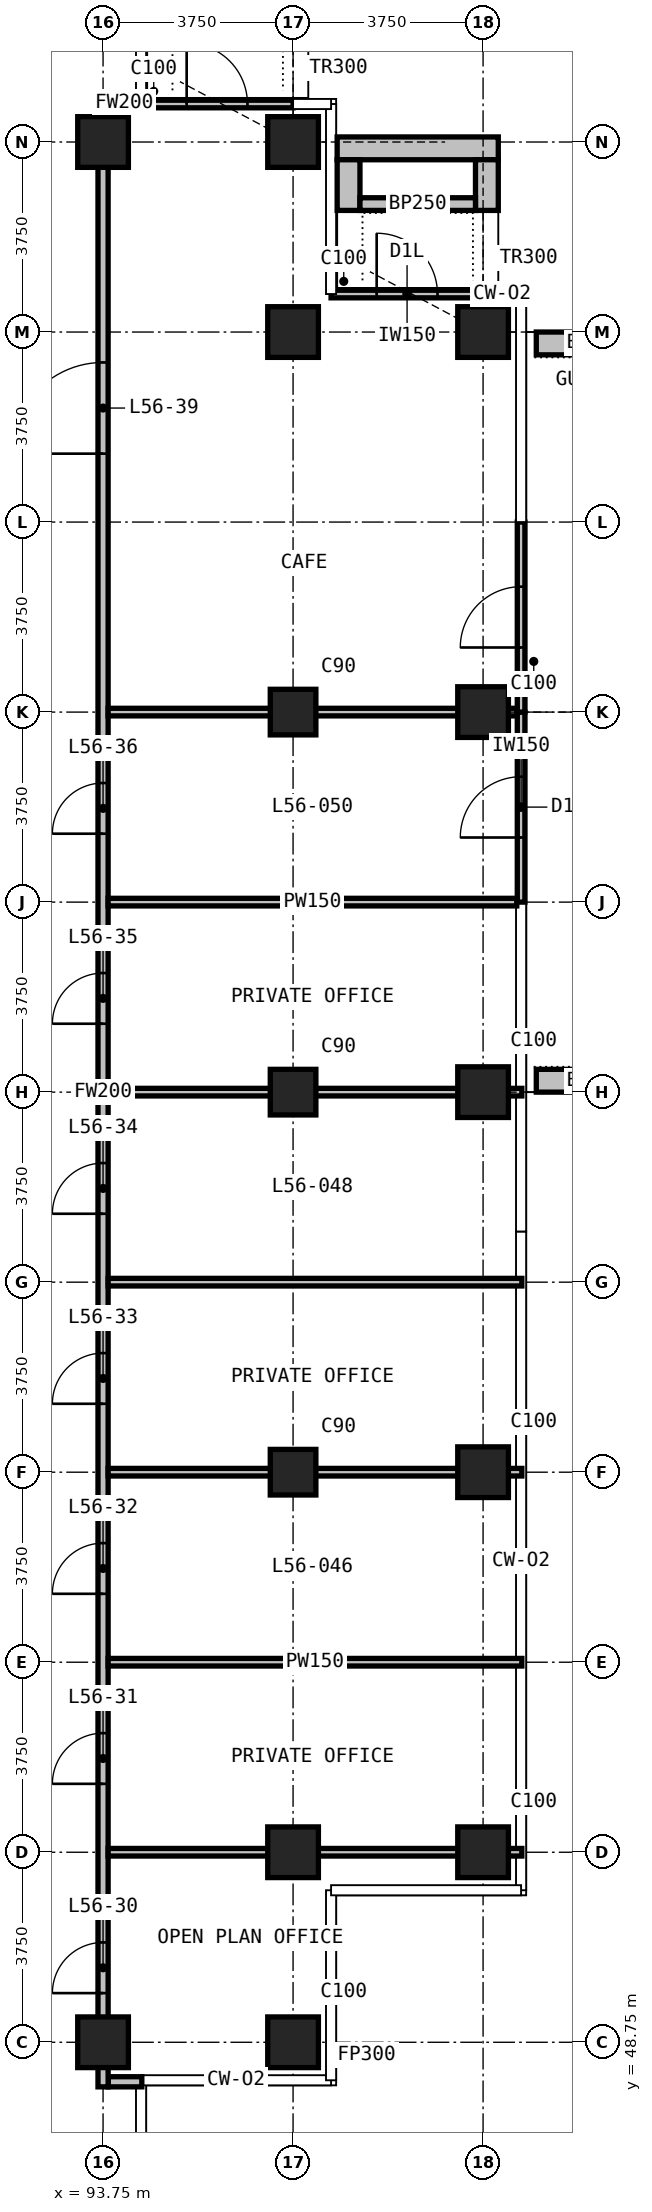
"""IFC4 building model, lengths in metres.
Left out: names, types, materials, properties, quantities, classifications, styles, units other than length and angle.
Written with IfcOpenShell. Run it as: python <this file> out.ifc"""

import sys

from ifc_helpers import new_model, si_unit, direction, frame, frame_2d, origin, origin_2d, place, context, subcontext, project, spatial, rectangle, extrude, element, fill, save


model = new_model("IFC4")
c1 = context("Model", 3, precision=1e-05, world=origin(), true_north=direction((0.0, 1.0)))
c2 = subcontext(c1, "Body", "Model", "MODEL_VIEW")
j1 = project(units=[si_unit("LENGTHUNIT", "METRE"), si_unit("PLANEANGLEUNIT", "RADIAN")], contexts=[c1])
p1 = place(None, origin())
s1 = spatial("IfcSite", under=j1, at=p1, CompositionType="ELEMENT")
p2 = place(p1, origin())
s2 = spatial("IfcBuilding", under=s1, at=p2, CompositionType="ELEMENT")
p3 = place(p2, frame((0.0, 0.0, 217.5)))
s3 = spatial("IfcBuildingStorey", under=s2, at=p3, CompositionType="ELEMENT", Elevation=217.5)
for number, where, z_axis, x_axis in (
    (1, (93.75, 48.75, 0.0), (0.0, 0.0, 1.0), (1.0, 0.0, 0.0)),
    (2, (93.75, 86.25, 0.0), (0.0, 0.0, 1.0), (1.0, 0.0, 0.0)),
    (3, (97.5, 48.75, 0.0), (0.0, 0.0, 1.0), (1.0, 0.0, 0.0)),
    (4, (97.5, 52.5, 0.0), (0.0, 0.0, 1.0), (1.0, 0.0, 0.0)),
):
    element("IfcColumn", number, at=place(p3, frame(where, z_axis=z_axis, x_axis=x_axis)), inside=s3, PredefinedType="COLUMN", context=c2, shape_type="SweptSolid", body=[
        extrude(rectangle(XDim=1.0, YDim=1.0, at=origin_2d()), origin(), (0.0, 0.0, 1.0), 3.6),
    ])
for number, where, z_axis, x_axis in (
    (5, (97.5, 60.0, 0.0), (0.0, 0.0, 1.0), (1.0, 0.0, 0.0)),
    (6, (97.5, 67.5, 0.0), (0.0, 0.0, 1.0), (1.0, 0.0, 0.0)),
    (7, (97.5, 75.0, 0.0), (0.0, 0.0, 1.0), (1.0, 0.0, 0.0)),
):
    element("IfcColumn", number, at=place(p3, frame(where, z_axis=z_axis, x_axis=x_axis)), inside=s3, PredefinedType="COLUMN", context=c2, shape_type="SweptSolid", body=[
        extrude(rectangle(XDim=0.9, YDim=0.9, at=origin_2d()), origin(), (0.0, 0.0, 1.0), 3.6),
    ])
for number, where, z_axis, x_axis in (
    (8, (97.5, 82.5, 0.0), (0.0, 0.0, 1.0), (1.0, 0.0, 0.0)),
    (9, (97.5, 86.25, 0.0), (0.0, 0.0, 1.0), (1.0, 0.0, 0.0)),
    (10, (101.25, 52.5, 0.0), (0.0, 0.0, 1.0), (1.0, 0.0, 0.0)),
    (11, (101.25, 60.0, 0.0), (0.0, 0.0, 1.0), (1.0, 0.0, 0.0)),
    (12, (101.25, 67.5, 0.0), (0.0, 0.0, 1.0), (1.0, 0.0, 0.0)),
    (13, (101.25, 75.0, 0.0), (0.0, 0.0, 1.0), (1.0, 0.0, 0.0)),
    (14, (101.25, 82.5, 0.0), (0.0, 0.0, 1.0), (1.0, 0.0, 0.0)),
):
    element("IfcColumn", number, at=place(p3, frame(where, z_axis=z_axis, x_axis=x_axis)), inside=s3, PredefinedType="COLUMN", context=c2, shape_type="SweptSolid", body=[
        extrude(rectangle(XDim=1.0, YDim=1.0, at=origin_2d()), origin(), (0.0, 0.0, 1.0), 3.6),
    ])
p4 = place(p3, frame((102.0, 71.25, 0.0), z_axis=(0.0, 0.0, 1.0), x_axis=(0.0, 1.0, 0.0)))
e15 = element("IfcWall", 15, at=p4, inside=s3, PredefinedType="SOLIDWALL", context=c2, shape_type="SweptSolid", body=[
    extrude(rectangle(XDim=3.75, YDim=0.15, at=frame_2d((1.875, 0.0))), origin(), (0.0, 0.0, 1.0), 3.3),
])
p5 = place(p4, frame((1.275, 0.0, 0.0)))
e16 = element("IfcOpeningElement", 16, at=p5, cuts=e15, PredefinedType="OPENING", context=c2, shape_type="SweptSolid", body=[
    extrude(rectangle(XDim=1.2, YDim=2.4, at=frame_2d((0.6, 1.2))), frame((0.0, 0.085, 0.0), z_axis=(0.0, -1.0, 0.0), x_axis=(1.0, 0.0, 0.0)), (0.0, 0.0, 1.0), 0.17),
])
p6 = place(p3, frame((102.0, 75.0, 0.0), z_axis=(0.0, 0.0, 1.0), x_axis=(0.0, 1.0, 0.0)))
e17 = element("IfcWall", 17, at=p6, inside=s3, PredefinedType="SOLIDWALL", context=c2, shape_type="SweptSolid", body=[
    extrude(rectangle(XDim=3.75, YDim=0.15, at=frame_2d((1.875, 0.0))), origin(), (0.0, 0.0, 1.0), 3.3),
])
p7 = place(p6, frame((1.275, 0.0, 0.0)))
e18 = element("IfcOpeningElement", 18, at=p7, cuts=e17, PredefinedType="OPENING", context=c2, shape_type="SweptSolid", body=[
    extrude(rectangle(XDim=1.2, YDim=2.4, at=frame_2d((0.6, 1.2))), frame((0.0, 0.085, 0.0), z_axis=(0.0, -1.0, 0.0), x_axis=(1.0, 0.0, 0.0)), (0.0, 0.0, 1.0), 0.17),
])
p8 = place(p3, frame((98.25, 83.25, 0.0), z_axis=(0.0, 0.0, 1.0), x_axis=(1.0, 0.0, 0.0)))
e19 = element("IfcWall", 19, at=p8, inside=s3, PredefinedType="SOLIDWALL", context=c2, shape_type="SweptSolid", body=[
    extrude(rectangle(XDim=3.0, YDim=0.15, at=frame_2d((1.5, 0.0))), origin(), (0.0, 0.0, 1.0), 3.3),
])
p9 = place(p8, frame((0.9, 0.0, 0.0)))
e20 = element("IfcOpeningElement", 20, at=p9, cuts=e19, PredefinedType="OPENING", context=c2, shape_type="SweptSolid", body=[
    extrude(rectangle(XDim=1.2, YDim=2.0, at=frame_2d((0.6, 1.0))), frame((0.0, 0.085, 0.0), z_axis=(0.0, -1.0, 0.0), x_axis=(1.0, 0.0, 0.0)), (0.0, 0.0, 1.0), 0.17),
])
p10 = place(p3, frame((94.5, 87.0, 0.0), z_axis=(0.0, 0.0, 1.0), x_axis=(1.0, 0.0, 0.0)))
e21 = element("IfcWall", 21, at=p10, inside=s3, PredefinedType="SOLIDWALL", context=c2, shape_type="SweptSolid", body=[
    extrude(rectangle(XDim=3.0, YDim=0.15, at=frame_2d((1.5, 0.0))), origin(), (0.0, 0.0, 1.0), 3.3),
])
p11 = place(p10, frame((0.9, 0.0, 0.0)))
e22 = element("IfcOpeningElement", 22, at=p11, cuts=e21, PredefinedType="OPENING", context=c2, shape_type="SweptSolid", body=[
    extrude(rectangle(XDim=1.2, YDim=2.0, at=frame_2d((0.6, 1.0))), frame((0.0, 0.085, 0.0), z_axis=(0.0, -1.0, 0.0), x_axis=(1.0, 0.0, 0.0)), (0.0, 0.0, 1.0), 0.17),
])
for number, where, z_axis, x_axis in (
    (23, (102.3, 67.725, 0.0), (0.0, 0.0, 1.0), (1.0, 0.0, 0.0)),
    (24, (102.3, 82.275, 0.0), (0.0, 0.0, 1.0), (1.0, 0.0, 0.0)),
):
    element("IfcWall", number, at=place(p3, frame(where, z_axis=z_axis, x_axis=x_axis)), inside=s3, PredefinedType="USERDEFINED", context=c2, shape_type="SweptSolid", body=[
        extrude(rectangle(XDim=2.35, YDim=0.45, at=frame_2d((1.175, 0.0))), origin(), (0.0, 0.0, 1.0), 1.1),
    ])
p12 = place(p3, frame((98.37, 86.125, 0.0), z_axis=(0.0, 0.0, 1.0), x_axis=(1.0, 0.0, 0.0)))
e25 = element("IfcWall", 25, at=p12, inside=s3, PredefinedType="USERDEFINED", context=c2, shape_type="SweptSolid", body=[
    extrude(rectangle(XDim=3.18, YDim=0.45, at=frame_2d((1.59, 0.0))), origin(), (0.0, 0.0, 1.0), 1.1),
])
for number, where, z_axis, x_axis in (
    (26, (98.595, 84.9, 0.0), (0.0, 0.0, 1.0), (0.0, 1.0, 0.0)),
    (27, (101.325, 84.9, 0.0), (0.0, 0.0, 1.0), (0.0, 1.0, 0.0)),
):
    element("IfcWall", number, at=place(p3, frame(where, z_axis=z_axis, x_axis=x_axis)), inside=s3, PredefinedType="USERDEFINED", context=c2, shape_type="SweptSolid", body=[
        extrude(rectangle(XDim=1.0, YDim=0.45, at=frame_2d((0.5, 0.0))), origin(), (0.0, 0.0, 1.0), 1.1),
    ])
p13 = place(p3, frame((98.82, 85.025, 0.0), z_axis=(0.0, 0.0, 1.0), x_axis=(1.0, 0.0, 0.0)))
e28 = element("IfcWall", 28, at=p13, inside=s3, PredefinedType="USERDEFINED", context=c2, shape_type="SweptSolid", body=[
    extrude(rectangle(XDim=2.28, YDim=0.25, at=frame_2d((1.14, 0.0))), origin(), (0.0, 0.0, 1.0), 1.0),
])
p14 = place(p3, frame((93.85, 47.97, 0.0), z_axis=(0.0, 0.0, 1.0), x_axis=(1.0, 0.0, 0.0)))
e29 = element("IfcWall", 29, at=p14, inside=s3, PredefinedType="PARTITIONING", context=c2, shape_type="SweptSolid", body=[
    extrude(rectangle(XDim=0.665, YDim=0.2, at=frame_2d((0.333, 0.0))), origin(), (0.0, 0.0, 1.0), 3.3),
])
p15 = place(p3, frame((93.85, 87.03, 0.0), z_axis=(0.0, 0.0, 1.0), x_axis=(1.0, 0.0, 0.0)))
e30 = element("IfcWall", 30, at=p15, inside=s3, PredefinedType="PARTITIONING", context=c2, shape_type="SweptSolid", body=[
    extrude(rectangle(XDim=0.64, YDim=0.2, at=frame_2d((0.32, 0.0))), origin(), (0.0, 0.0, 1.0), 3.3),
])
p16 = place(p3, frame((93.75, 47.87, 0.0), z_axis=(0.0, 0.0, 1.0), x_axis=(0.0, 1.0, 0.0)))
e31 = element("IfcWall", 31, at=p16, inside=s3, PredefinedType="PARTITIONING", context=c2, shape_type="SweptSolid", body=[
    extrude(rectangle(XDim=39.26, YDim=0.2, at=frame_2d((19.63, 0.0))), origin(), (0.0, 0.0, 1.0), 3.3),
])
p17 = place(p16, frame((1.85, 0.0, 0.0)))
e32 = element("IfcOpeningElement", 32, at=p17, cuts=e31, PredefinedType="OPENING", context=c2, shape_type="SweptSolid", body=[
    extrude(rectangle(XDim=1.0, YDim=2.2, at=frame_2d((0.5, 1.1))), frame((0.0, 0.11, 0.0), z_axis=(0.0, -1.0, 0.0), x_axis=(1.0, 0.0, 0.0)), (0.0, 0.0, 1.0), 0.22),
])
p18 = place(p16, frame((5.98, 0.0, 0.0)))
e33 = element("IfcOpeningElement", 33, at=p18, cuts=e31, PredefinedType="OPENING", context=c2, shape_type="SweptSolid", body=[
    extrude(rectangle(XDim=1.0, YDim=2.2, at=frame_2d((0.5, 1.1))), frame((0.0, 0.11, 0.0), z_axis=(0.0, -1.0, 0.0), x_axis=(1.0, 0.0, 0.0)), (0.0, 0.0, 1.0), 0.22),
])
p19 = place(p16, frame((9.73, 0.0, 0.0)))
e34 = element("IfcOpeningElement", 34, at=p19, cuts=e31, PredefinedType="OPENING", context=c2, shape_type="SweptSolid", body=[
    extrude(rectangle(XDim=1.0, YDim=2.2, at=frame_2d((0.5, 1.1))), frame((0.0, 0.11, 0.0), z_axis=(0.0, -1.0, 0.0), x_axis=(1.0, 0.0, 0.0)), (0.0, 0.0, 1.0), 0.22),
])
p20 = place(p16, frame((13.48, 0.0, 0.0)))
e35 = element("IfcOpeningElement", 35, at=p20, cuts=e31, PredefinedType="OPENING", context=c2, shape_type="SweptSolid", body=[
    extrude(rectangle(XDim=1.0, YDim=2.2, at=frame_2d((0.5, 1.1))), frame((0.0, 0.11, 0.0), z_axis=(0.0, -1.0, 0.0), x_axis=(1.0, 0.0, 0.0)), (0.0, 0.0, 1.0), 0.22),
])
p21 = place(p16, frame((17.23, 0.0, 0.0)))
e36 = element("IfcOpeningElement", 36, at=p21, cuts=e31, PredefinedType="OPENING", context=c2, shape_type="SweptSolid", body=[
    extrude(rectangle(XDim=1.0, YDim=2.2, at=frame_2d((0.5, 1.1))), frame((0.0, 0.11, 0.0), z_axis=(0.0, -1.0, 0.0), x_axis=(1.0, 0.0, 0.0)), (0.0, 0.0, 1.0), 0.22),
])
p22 = place(p16, frame((20.98, 0.0, 0.0)))
e37 = element("IfcOpeningElement", 37, at=p22, cuts=e31, PredefinedType="OPENING", context=c2, shape_type="SweptSolid", body=[
    extrude(rectangle(XDim=1.0, YDim=2.2, at=frame_2d((0.5, 1.1))), frame((0.0, 0.11, 0.0), z_axis=(0.0, -1.0, 0.0), x_axis=(1.0, 0.0, 0.0)), (0.0, 0.0, 1.0), 0.22),
])
p23 = place(p16, frame((24.73, 0.0, 0.0)))
e38 = element("IfcOpeningElement", 38, at=p23, cuts=e31, PredefinedType="OPENING", context=c2, shape_type="SweptSolid", body=[
    extrude(rectangle(XDim=1.0, YDim=2.2, at=frame_2d((0.5, 1.1))), frame((0.0, 0.11, 0.0), z_axis=(0.0, -1.0, 0.0), x_axis=(1.0, 0.0, 0.0)), (0.0, 0.0, 1.0), 0.22),
])
p24 = place(p16, frame((32.23, 0.0, 0.0)))
e39 = element("IfcOpeningElement", 39, at=p24, cuts=e31, PredefinedType="OPENING", context=c2, shape_type="SweptSolid", body=[
    extrude(rectangle(XDim=1.8, YDim=2.2, at=frame_2d((0.9, 1.1))), frame((0.0, 0.11, 0.0), z_axis=(0.0, -1.0, 0.0), x_axis=(1.0, 0.0, 0.0)), (0.0, 0.0, 1.0), 0.22),
])
for number, where, z_axis, x_axis in (
    (40, (93.85, 52.5, 0.0), (0.0, 0.0, 1.0), (1.0, 0.0, 0.0)),
    (41, (93.85, 56.25, 0.0), (0.0, 0.0, 1.0), (1.0, 0.0, 0.0)),
    (42, (93.85, 60.0, 0.0), (0.0, 0.0, 1.0), (1.0, 0.0, 0.0)),
    (43, (93.85, 63.75, 0.0), (0.0, 0.0, 1.0), (1.0, 0.0, 0.0)),
    (44, (93.85, 67.5, 0.0), (0.0, 0.0, 1.0), (1.0, 0.0, 0.0)),
):
    element("IfcWall", number, at=place(p3, frame(where, z_axis=z_axis, x_axis=x_axis)), inside=s3, PredefinedType="PARTITIONING", context=c2, shape_type="SweptSolid", body=[
        extrude(rectangle(XDim=8.165, YDim=0.15, at=frame_2d((4.083, 0.0))), origin(), (0.0, 0.0, 1.0), 3.3),
    ])
for number, where, z_axis, x_axis in (
    (45, (93.85, 71.25, 0.0), (0.0, 0.0, 1.0), (1.0, 0.0, 0.0)),
    (46, (93.85, 75.0, 0.0), (0.0, 0.0, 1.0), (1.0, 0.0, 0.0)),
):
    element("IfcWall", number, at=place(p3, frame(where, z_axis=z_axis, x_axis=x_axis)), inside=s3, PredefinedType="PARTITIONING", context=c2, shape_type="SweptSolid", body=[
        extrude(rectangle(XDim=8.065, YDim=0.15, at=frame_2d((4.032, 0.0))), origin(), (0.0, 0.0, 1.0), 3.3),
    ])
p25 = place(p5, origin())
e47 = element("IfcDoor", 47, at=p25, inside=s3, OperationType="SINGLE_SWING_LEFT", PredefinedType="DOOR", context=c2, shape_type="SweptSolid", body=[
    extrude(rectangle(XDim=1.2, YDim=2.4, at=frame_2d((0.6, 1.2))), frame((0.0, 0.025, 0.0), z_axis=(0.0, -1.0, 0.0), x_axis=(1.0, 0.0, 0.0)), (0.0, 0.0, 1.0), 0.05),
])
fill(e16, e47)
p26 = place(p7, origin())
e48 = element("IfcDoor", 48, at=p26, inside=s3, OperationType="SINGLE_SWING_LEFT", PredefinedType="DOOR", context=c2, shape_type="SweptSolid", body=[
    extrude(rectangle(XDim=1.2, YDim=2.4, at=frame_2d((0.6, 1.2))), frame((0.0, 0.025, 0.0), z_axis=(0.0, -1.0, 0.0), x_axis=(1.0, 0.0, 0.0)), (0.0, 0.0, 1.0), 0.05),
])
fill(e18, e48)
p27 = place(p9, origin())
e49 = element("IfcDoor", 49, at=p27, inside=s3, OperationType="SINGLE_SWING_LEFT", PredefinedType="DOOR", context=c2, shape_type="SweptSolid", body=[
    extrude(rectangle(XDim=1.2, YDim=2.0, at=frame_2d((0.6, 1.0))), frame((0.0, 0.025, 0.0), z_axis=(0.0, -1.0, 0.0), x_axis=(1.0, 0.0, 0.0)), (0.0, 0.0, 1.0), 0.05),
])
fill(e20, e49)
p28 = place(p11, origin())
e50 = element("IfcDoor", 50, at=p28, inside=s3, OperationType="SINGLE_SWING_LEFT", PredefinedType="DOOR", context=c2, shape_type="SweptSolid", body=[
    extrude(rectangle(XDim=1.2, YDim=2.0, at=frame_2d((0.6, 1.0))), frame((0.0, 0.025, 0.0), z_axis=(0.0, -1.0, 0.0), x_axis=(1.0, 0.0, 0.0)), (0.0, 0.0, 1.0), 0.05),
])
fill(e22, e50)
p29 = place(p17, origin())
e51 = element("IfcDoor", 51, at=p29, inside=s3, OperationType="SINGLE_SWING_LEFT", PredefinedType="DOOR", context=c2, shape_type="SweptSolid", body=[
    extrude(rectangle(XDim=1.0, YDim=2.2, at=frame_2d((0.5, 1.1))), frame((0.0, 0.025, 0.0), z_axis=(0.0, -1.0, 0.0), x_axis=(1.0, 0.0, 0.0)), (0.0, 0.0, 1.0), 0.05),
])
fill(e32, e51)
p30 = place(p18, origin())
e52 = element("IfcDoor", 52, at=p30, inside=s3, OperationType="SINGLE_SWING_LEFT", PredefinedType="DOOR", context=c2, shape_type="SweptSolid", body=[
    extrude(rectangle(XDim=1.0, YDim=2.2, at=frame_2d((0.5, 1.1))), frame((0.0, 0.025, 0.0), z_axis=(0.0, -1.0, 0.0), x_axis=(1.0, 0.0, 0.0)), (0.0, 0.0, 1.0), 0.05),
])
fill(e33, e52)
p31 = place(p19, origin())
e53 = element("IfcDoor", 53, at=p31, inside=s3, OperationType="SINGLE_SWING_RIGHT", PredefinedType="DOOR", context=c2, shape_type="SweptSolid", body=[
    extrude(rectangle(XDim=1.0, YDim=2.2, at=frame_2d((0.5, 1.1))), frame((0.0, 0.025, 0.0), z_axis=(0.0, -1.0, 0.0), x_axis=(1.0, 0.0, 0.0)), (0.0, 0.0, 1.0), 0.05),
])
fill(e34, e53)
p32 = place(p20, origin())
e54 = element("IfcDoor", 54, at=p32, inside=s3, OperationType="SINGLE_SWING_LEFT", PredefinedType="DOOR", context=c2, shape_type="SweptSolid", body=[
    extrude(rectangle(XDim=1.0, YDim=2.2, at=frame_2d((0.5, 1.1))), frame((0.0, 0.025, 0.0), z_axis=(0.0, -1.0, 0.0), x_axis=(1.0, 0.0, 0.0)), (0.0, 0.0, 1.0), 0.05),
])
fill(e35, e54)
p33 = place(p21, origin())
e55 = element("IfcDoor", 55, at=p33, inside=s3, OperationType="SINGLE_SWING_LEFT", PredefinedType="DOOR", context=c2, shape_type="SweptSolid", body=[
    extrude(rectangle(XDim=1.0, YDim=2.2, at=frame_2d((0.5, 1.1))), frame((0.0, 0.025, 0.0), z_axis=(0.0, -1.0, 0.0), x_axis=(1.0, 0.0, 0.0)), (0.0, 0.0, 1.0), 0.05),
])
fill(e36, e55)
p34 = place(p22, origin())
e56 = element("IfcDoor", 56, at=p34, inside=s3, OperationType="SINGLE_SWING_RIGHT", PredefinedType="DOOR", context=c2, shape_type="SweptSolid", body=[
    extrude(rectangle(XDim=1.0, YDim=2.2, at=frame_2d((0.5, 1.1))), frame((0.0, 0.025, 0.0), z_axis=(0.0, -1.0, 0.0), x_axis=(1.0, 0.0, 0.0)), (0.0, 0.0, 1.0), 0.05),
])
fill(e37, e56)
p35 = place(p23, origin())
e57 = element("IfcDoor", 57, at=p35, inside=s3, OperationType="SINGLE_SWING_LEFT", PredefinedType="DOOR", context=c2, shape_type="SweptSolid", body=[
    extrude(rectangle(XDim=1.0, YDim=2.2, at=frame_2d((0.5, 1.1))), frame((0.0, 0.025, 0.0), z_axis=(0.0, -1.0, 0.0), x_axis=(1.0, 0.0, 0.0)), (0.0, 0.0, 1.0), 0.05),
])
fill(e38, e57)
p36 = place(p24, origin())
e58 = element("IfcDoor", 58, at=p36, inside=s3, OperationType="DOUBLE_DOOR_SINGLE_SWING", PredefinedType="DOOR", context=c2, shape_type="SweptSolid", body=[
    extrude(rectangle(XDim=1.8, YDim=2.2, at=frame_2d((0.9, 1.1))), frame((0.0, 0.025, 0.0), z_axis=(0.0, -1.0, 0.0), x_axis=(1.0, 0.0, 0.0)), (0.0, 0.0, 1.0), 0.05),
])
fill(e39, e58)
save(model, sys.argv[1])
